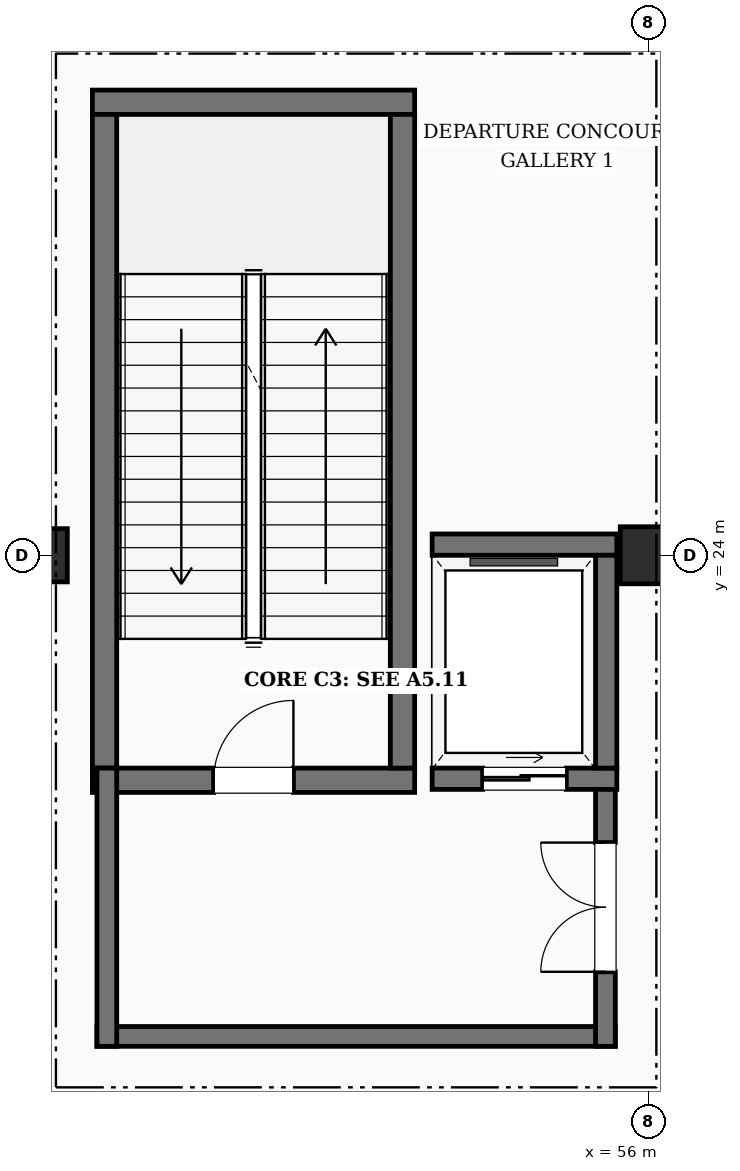
"""IFC4 building model, lengths in metres.
Left out: names, types, materials, properties, quantities, classifications, styles, units other than length and angle.
Written with IfcOpenShell. Run it as: python <this file> out.ifc"""

import sys

from ifc_helpers import new_model, si_unit, direction, frame, frame_2d, origin, origin_2d, place, context, subcontext, project, spatial, rectangle, extrude, element, fill, save


model = new_model("IFC4")
c1 = context("Model", 3, precision=1e-05, world=origin(), true_north=direction((0.0, 1.0)))
c2 = subcontext(c1, "Body", "Model", "MODEL_VIEW")
j1 = project(units=[si_unit("LENGTHUNIT", "METRE"), si_unit("PLANEANGLEUNIT", "RADIAN")], contexts=[c1])
p1 = place(None, origin())
s1 = spatial("IfcSite", under=j1, at=p1, CompositionType="ELEMENT")
p2 = place(p1, origin())
s2 = spatial("IfcBuilding", under=s1, at=p2, CompositionType="ELEMENT")
p3 = place(p2, frame((0.0, 0.0, 5.4)))
s3 = spatial("IfcBuildingStorey", under=s2, at=p3, CompositionType="ELEMENT", Elevation=5.4)
p4 = place(p3, frame((48.0, 24.0, 0.0), z_axis=(0.0, 0.0, 1.0), x_axis=(1.0, 0.0, 0.0)))
e1 = element("IfcColumn", 1, at=p4, inside=s3, PredefinedType="COLUMN", context=c2, shape_type="SweptSolid", body=[
    extrude(rectangle(XDim=0.7, YDim=0.7, at=origin_2d()), origin(), (0.0, 0.0, 1.0), 5.4),
])
p5 = place(p3, frame((56.0, 24.0, 0.0), z_axis=(0.0, 0.0, 1.0), x_axis=(1.0, 0.0, 0.0)))
e2 = element("IfcColumn", 2, at=p5, inside=s3, PredefinedType="COLUMN", context=c2, shape_type="SweptSolid", body=[
    extrude(rectangle(XDim=0.75, YDim=0.75, at=origin_2d()), origin(), (0.0, 0.0, 1.0), 5.4),
])
p6 = place(p3, frame((48.68, 21.04, 0.0), z_axis=(0.0, 0.0, 1.0), x_axis=(1.0, 0.0, 0.0)))
e3 = element("IfcWall", 3, at=p6, inside=s3, PredefinedType="SHEAR", context=c2, shape_type="SweptSolid", body=[
    extrude(rectangle(XDim=4.24, YDim=0.32, at=frame_2d((2.12, 0.0))), origin(), (0.0, 0.0, 1.0), 5.4),
])
p7 = place(p6, frame((1.595, 0.0, 0.0)))
e4 = element("IfcOpeningElement", 4, at=p7, cuts=e3, PredefinedType="OPENING", context=c2, shape_type="SweptSolid", body=[
    extrude(rectangle(XDim=1.05, YDim=2.15, at=frame_2d((0.525, 1.075))), frame((0.0, 0.17, 0.0), z_axis=(0.0, -1.0, 0.0), x_axis=(1.0, 0.0, 0.0)), (0.0, 0.0, 1.0), 0.34),
])
p8 = place(p3, frame((48.68, 29.96, 0.0), z_axis=(0.0, 0.0, 1.0), x_axis=(1.0, 0.0, 0.0)))
e5 = element("IfcWall", 5, at=p8, inside=s3, PredefinedType="SHEAR", context=c2, shape_type="SweptSolid", body=[
    extrude(rectangle(XDim=4.24, YDim=0.32, at=frame_2d((2.12, 0.0))), origin(), (0.0, 0.0, 1.0), 5.4),
])
for number, where, z_axis, x_axis in (
    (6, (48.84, 21.2, 0.0), (0.0, 0.0, 1.0), (0.0, 1.0, 0.0)),
    (7, (52.76, 21.2, 0.0), (0.0, 0.0, 1.0), (0.0, 1.0, 0.0)),
):
    element("IfcWall", number, at=place(p3, frame(where, z_axis=z_axis, x_axis=x_axis)), inside=s3, PredefinedType="SHEAR", context=c2, shape_type="SweptSolid", body=[
        extrude(rectangle(XDim=8.6, YDim=0.32, at=frame_2d((4.3, 0.0))), origin(), (0.0, 0.0, 1.0), 5.4),
    ])
p9 = place(p3, frame((55.56, 17.67, 0.0), z_axis=(0.0, 0.0, 1.0), x_axis=(-1.0, 0.0, 0.0)))
e8 = element("IfcWall", 8, at=p9, inside=s3, PredefinedType="SHEAR", context=c2, shape_type="SweptSolid", body=[
    extrude(rectangle(XDim=6.82, YDim=0.26, at=frame_2d((3.41, 0.0))), origin(), (0.0, 0.0, 1.0), 5.4),
])
p10 = place(p3, frame((48.87, 17.54, 0.0), z_axis=(0.0, 0.0, 1.0), x_axis=(0.0, 1.0, 0.0)))
e9 = element("IfcWall", 9, at=p10, inside=s3, PredefinedType="SHEAR", context=c2, shape_type="SweptSolid", body=[
    extrude(rectangle(XDim=3.66, YDim=0.26, at=frame_2d((1.83, 0.0))), origin(), (0.0, 0.0, 1.0), 5.4),
])
p11 = place(p3, frame((55.43, 17.54, 0.0), z_axis=(0.0, 0.0, 1.0), x_axis=(0.0, 1.0, 0.0)))
e10 = element("IfcWall", 10, at=p11, inside=s3, PredefinedType="SHEAR", context=c2, shape_type="SweptSolid", body=[
    extrude(rectangle(XDim=3.66, YDim=0.26, at=frame_2d((1.83, 0.0))), origin(), (0.0, 0.0, 1.0), 5.4),
])
p12 = place(p11, frame((0.98, 0.0, 0.0)))
e11 = element("IfcOpeningElement", 11, at=p12, cuts=e10, PredefinedType="OPENING", context=c2, shape_type="SweptSolid", body=[
    extrude(rectangle(XDim=1.7, YDim=2.2, at=frame_2d((0.85, 1.1))), frame((0.0, 0.14, 0.0), z_axis=(0.0, -1.0, 0.0), x_axis=(1.0, 0.0, 0.0)), (0.0, 0.0, 1.0), 0.28),
])
p13 = place(p3, frame((53.15, 21.06, 0.0), z_axis=(0.0, 0.0, 1.0), x_axis=(1.0, 0.0, 0.0)))
e12 = element("IfcWall", 12, at=p13, inside=s3, PredefinedType="SHEAR", context=c2, shape_type="SweptSolid", body=[
    extrude(rectangle(XDim=2.43, YDim=0.28, at=frame_2d((1.215, 0.0))), origin(), (0.0, 0.0, 1.0), 5.4),
])
p14 = place(p13, frame((0.665, 0.0, 0.0)))
e13 = element("IfcOpeningElement", 13, at=p14, cuts=e12, PredefinedType="OPENING", context=c2, shape_type="SweptSolid", body=[
    extrude(rectangle(XDim=1.1, YDim=2.15, at=frame_2d((0.55, 1.075))), frame((0.0, 0.15, 0.0), z_axis=(0.0, -1.0, 0.0), x_axis=(1.0, 0.0, 0.0)), (0.0, 0.0, 1.0), 0.3),
])
p15 = place(p3, frame((53.15, 24.14, 0.0), z_axis=(0.0, 0.0, 1.0), x_axis=(1.0, 0.0, 0.0)))
e14 = element("IfcWall", 14, at=p15, inside=s3, PredefinedType="SHEAR", context=c2, shape_type="SweptSolid", body=[
    extrude(rectangle(XDim=2.43, YDim=0.28, at=frame_2d((1.215, 0.0))), origin(), (0.0, 0.0, 1.0), 5.4),
])
p16 = place(p3, frame((55.44, 21.2, 0.0), z_axis=(0.0, 0.0, 1.0), x_axis=(0.0, 1.0, 0.0)))
e15 = element("IfcWall", 15, at=p16, inside=s3, PredefinedType="SHEAR", context=c2, shape_type="SweptSolid", body=[
    extrude(rectangle(XDim=2.8, YDim=0.28, at=frame_2d((1.4, 0.0))), origin(), (0.0, 0.0, 1.0), 5.4),
])
p17 = place(p7, origin())
e16 = element("IfcDoor", 16, at=p17, inside=s3, OperationType="SINGLE_SWING_RIGHT", PredefinedType="DOOR", context=c2, shape_type="SweptSolid", body=[
    extrude(rectangle(XDim=1.05, YDim=2.15, at=frame_2d((0.525, 1.075))), frame((0.0, 0.025, 0.0), z_axis=(0.0, -1.0, 0.0), x_axis=(1.0, 0.0, 0.0)), (0.0, 0.0, 1.0), 0.05),
])
fill(e4, e16)
p18 = place(p12, origin())
e17 = element("IfcDoor", 17, at=p18, inside=s3, OperationType="DOUBLE_DOOR_SINGLE_SWING", PredefinedType="DOOR", context=c2, shape_type="SweptSolid", body=[
    extrude(rectangle(XDim=1.7, YDim=2.2, at=frame_2d((0.85, 1.1))), frame((0.0, 0.025, 0.0), z_axis=(0.0, -1.0, 0.0), x_axis=(1.0, 0.0, 0.0)), (0.0, 0.0, 1.0), 0.05),
])
fill(e11, e17)
p19 = place(p14, origin())
e18 = element("IfcDoor", 18, at=p19, inside=s3, OperationType="SLIDING_TO_LEFT", PredefinedType="DOOR", context=c2, shape_type="SweptSolid", body=[
    extrude(rectangle(XDim=1.1, YDim=2.15, at=frame_2d((0.55, 1.075))), frame((0.0, 0.025, 0.0), z_axis=(0.0, -1.0, 0.0), x_axis=(1.0, 0.0, 0.0)), (0.0, 0.0, 1.0), 0.05),
])
fill(e13, e18)
save(model, sys.argv[1])
